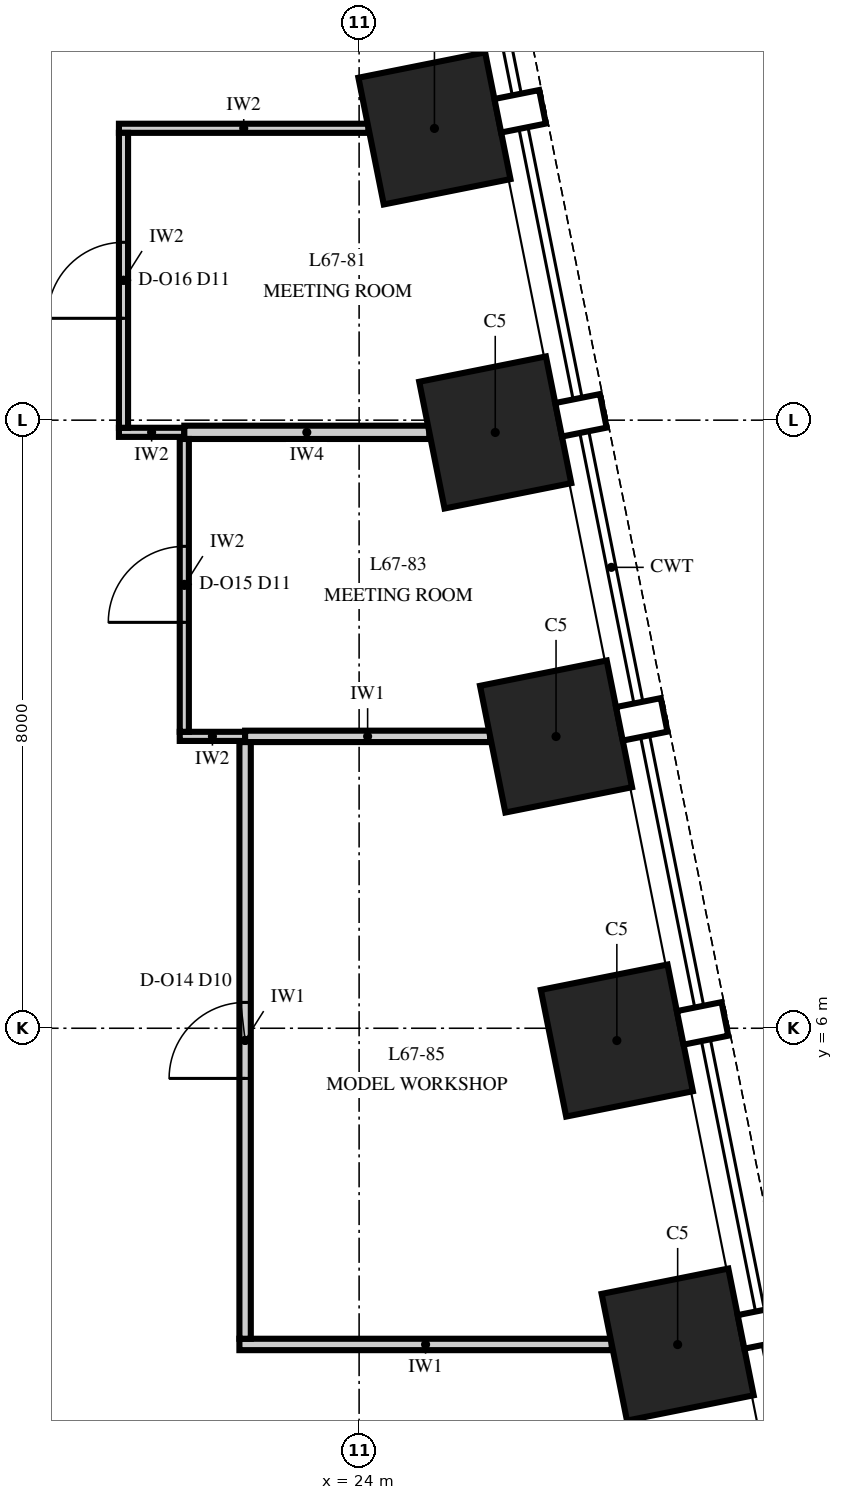
"""IFC4 building model, lengths in metres.
Left out: names, types, materials, properties, quantities, classifications, styles, units other than length and angle.
Written with IfcOpenShell. Run it as: python <this file> out.ifc"""

import sys

from ifc_helpers import new_model, si_unit, direction, frame, frame_2d, origin, origin_2d, place, context, subcontext, project, spatial, rectangle, extrude, element, fill, save


model = new_model("IFC4")
c1 = context("Model", 3, precision=1e-05, world=origin(), true_north=direction((0.0, 1.0)))
c2 = subcontext(c1, "Body", "Model", "MODEL_VIEW")
j1 = project(units=[si_unit("LENGTHUNIT", "METRE"), si_unit("PLANEANGLEUNIT", "RADIAN")], contexts=[c1])
p1 = place(None, origin())
s1 = spatial("IfcSite", under=j1, at=p1, CompositionType="ELEMENT")
p2 = place(p1, origin())
s2 = spatial("IfcBuilding", under=s1, at=p2, CompositionType="ELEMENT")
p3 = place(p2, frame((0.0, 0.0, 288.0)))
s3 = spatial("IfcBuildingStorey", under=s2, at=p3, CompositionType="ELEMENT", Elevation=288.0)
for number, where, z_axis, x_axis in (
    (1, (28.191, 1.838, 0.0), (0.0, 0.0, 1.0), (-0.196, 0.981, 0.0)),
    (2, (27.391, 5.838, 0.0), (0.0, 0.0, 1.0), (-0.196, 0.981, 0.0)),
    (3, (26.591, 9.838, 0.0), (0.0, 0.0, 1.0), (-0.196, 0.981, 0.0)),
    (4, (25.791, 13.838, 0.0), (0.0, 0.0, 1.0), (-0.196, 0.981, 0.0)),
    (5, (24.991, 17.838, 0.0), (0.0, 0.0, 1.0), (-0.196, 0.981, 0.0)),
):
    element("IfcColumn", number, at=place(p3, frame(where, z_axis=z_axis, x_axis=x_axis)), inside=s3, PredefinedType="COLUMN", context=c2, shape_type="SweptSolid", body=[
        extrude(rectangle(XDim=1.7, YDim=1.7, at=origin_2d()), origin(), (0.0, 0.0, 1.0), 4.0),
    ])
p4 = place(p3, frame((22.425, 1.84, 0.0), z_axis=(0.0, 0.0, 1.0), x_axis=(1.0, 0.0, 0.0)))
e6 = element("IfcWall", 6, at=p4, inside=s3, PredefinedType="PARTITIONING", context=c2, shape_type="SweptSolid", body=[
    extrude(rectangle(XDim=4.899, YDim=0.15, at=frame_2d((2.449, 0.0))), origin(), (0.0, 0.0, 1.0), 3.23),
])
p5 = place(p3, frame((21.64, 9.84, 0.0), z_axis=(0.0, 0.0, 1.0), x_axis=(1.0, 0.0, 0.0)))
e7 = element("IfcWall", 7, at=p5, inside=s3, PredefinedType="PARTITIONING", context=c2, shape_type="SweptSolid", body=[
    extrude(rectangle(XDim=0.86, YDim=0.12, at=frame_2d((0.43, 0.0))), origin(), (0.0, 0.0, 1.0), 3.85),
])
p6 = place(p3, frame((22.5, 9.84, 0.0), z_axis=(0.0, 0.0, 1.0), x_axis=(1.0, 0.0, 0.0)))
e8 = element("IfcWall", 8, at=p6, inside=s3, PredefinedType="PARTITIONING", context=c2, shape_type="SweptSolid", body=[
    extrude(rectangle(XDim=3.224, YDim=0.15, at=frame_2d((1.612, 0.0))), origin(), (0.0, 0.0, 1.0), 3.23),
])
p7 = place(p3, frame((20.84, 13.84, 0.0), z_axis=(0.0, 0.0, 1.0), x_axis=(1.0, 0.0, 0.0)))
e9 = element("IfcWall", 9, at=p7, inside=s3, PredefinedType="PARTITIONING", context=c2, shape_type="SweptSolid", body=[
    extrude(rectangle(XDim=0.86, YDim=0.12, at=frame_2d((0.43, 0.0))), origin(), (0.0, 0.0, 1.0), 3.85),
])
p8 = place(p3, frame((21.7, 13.84, 0.0), z_axis=(0.0, 0.0, 1.0), x_axis=(1.0, 0.0, 0.0)))
e10 = element("IfcWall", 10, at=p8, inside=s3, PredefinedType="PARTITIONING", context=c2, shape_type="SweptSolid", body=[
    extrude(rectangle(XDim=3.224, YDim=0.175, at=frame_2d((1.612, 0.0))), origin(), (0.0, 0.0, 1.0), 3.23),
])
p9 = place(p3, frame((20.84, 17.84, 0.0), z_axis=(0.0, 0.0, 1.0), x_axis=(1.0, 0.0, 0.0)))
e11 = element("IfcWall", 11, at=p9, inside=s3, PredefinedType="PARTITIONING", context=c2, shape_type="SweptSolid", body=[
    extrude(rectangle(XDim=3.284, YDim=0.12, at=frame_2d((1.642, 0.0))), origin(), (0.0, 0.0, 1.0), 3.23),
])
p10 = place(p3, frame((20.9, 13.9, 0.0), z_axis=(0.0, 0.0, 1.0), x_axis=(0.0, 1.0, 0.0)))
e12 = element("IfcWall", 12, at=p10, inside=s3, PredefinedType="PARTITIONING", context=c2, shape_type="SweptSolid", body=[
    extrude(rectangle(XDim=3.88, YDim=0.12, at=frame_2d((1.94, 0.0))), origin(), (0.0, 0.0, 1.0), 3.23),
])
p11 = place(p10, frame((1.44, 0.0, 0.0)))
e13 = element("IfcOpeningElement", 13, at=p11, cuts=e12, PredefinedType="OPENING", context=c2, shape_type="SweptSolid", body=[
    extrude(rectangle(XDim=1.0, YDim=2.4, at=frame_2d((0.5, 1.2))), frame((0.0, 0.075, 0.0), z_axis=(0.0, -1.0, 0.0), x_axis=(1.0, 0.0, 0.0)), (0.0, 0.0, 1.0), 0.15),
])
p12 = place(p3, frame((21.7, 9.9, 0.0), z_axis=(0.0, 0.0, 1.0), x_axis=(0.0, 1.0, 0.0)))
e14 = element("IfcWall", 14, at=p12, inside=s3, PredefinedType="PARTITIONING", context=c2, shape_type="SweptSolid", body=[
    extrude(rectangle(XDim=3.853, YDim=0.12, at=frame_2d((1.926, 0.0))), origin(), (0.0, 0.0, 1.0), 3.85),
])
p13 = place(p12, frame((1.44, 0.0, 0.0)))
e15 = element("IfcOpeningElement", 15, at=p13, cuts=e14, PredefinedType="OPENING", context=c2, shape_type="SweptSolid", body=[
    extrude(rectangle(XDim=1.0, YDim=2.4, at=frame_2d((0.5, 1.2))), frame((0.0, 0.075, 0.0), z_axis=(0.0, -1.0, 0.0), x_axis=(1.0, 0.0, 0.0)), (0.0, 0.0, 1.0), 0.15),
])
p14 = place(p3, frame((22.5, 1.915, 0.0), z_axis=(0.0, 0.0, 1.0), x_axis=(0.0, 1.0, 0.0)))
e16 = element("IfcWall", 16, at=p14, inside=s3, PredefinedType="PARTITIONING", context=c2, shape_type="SweptSolid", body=[
    extrude(rectangle(XDim=7.85, YDim=0.15, at=frame_2d((3.925, 0.0))), origin(), (0.0, 0.0, 1.0), 2.842),
])
p15 = place(p14, frame((3.425, 0.0, 0.0)))
e17 = element("IfcOpeningElement", 17, at=p15, cuts=e16, PredefinedType="OPENING", context=c2, shape_type="SweptSolid", body=[
    extrude(rectangle(XDim=1.0, YDim=2.3, at=frame_2d((0.5, 1.15))), frame((0.0, 0.09, 0.0), z_axis=(0.0, -1.0, 0.0), x_axis=(1.0, 0.0, 0.0)), (0.0, 0.0, 1.0), 0.18),
])
p16 = place(p15, origin())
e18 = element("IfcDoor", 18, at=p16, inside=s3, OperationType="SINGLE_SWING_LEFT", PredefinedType="DOOR", context=c2, shape_type="SweptSolid", body=[
    extrude(rectangle(XDim=1.0, YDim=2.3, at=frame_2d((0.5, 1.15))), frame((0.0, 0.075, 0.0), z_axis=(0.0, -1.0, 0.0), x_axis=(1.0, 0.0, 0.0)), (0.0, 0.0, 1.0), 0.149),
])
fill(e17, e18)
p17 = place(p13, origin())
e19 = element("IfcDoor", 19, at=p17, inside=s3, OperationType="SINGLE_SWING_RIGHT", PredefinedType="DOOR", context=c2, shape_type="SweptSolid", body=[
    extrude(rectangle(XDim=1.0, YDim=2.4, at=frame_2d((0.5, 1.2))), frame((0.0, 0.06, 0.0), z_axis=(0.0, -1.0, 0.0), x_axis=(1.0, 0.0, 0.0)), (0.0, 0.0, 1.0), 0.12),
])
fill(e15, e19)
p18 = place(p11, origin())
e20 = element("IfcDoor", 20, at=p18, inside=s3, OperationType="SINGLE_SWING_RIGHT", PredefinedType="DOOR", context=c2, shape_type="SweptSolid", body=[
    extrude(rectangle(XDim=1.0, YDim=2.4, at=frame_2d((0.5, 1.2))), frame((0.0, 0.06, 0.0), z_axis=(0.0, -1.0, 0.0), x_axis=(1.0, 0.0, 0.0)), (0.0, 0.0, 1.0), 0.12),
])
fill(e13, e20)
save(model, sys.argv[1])
